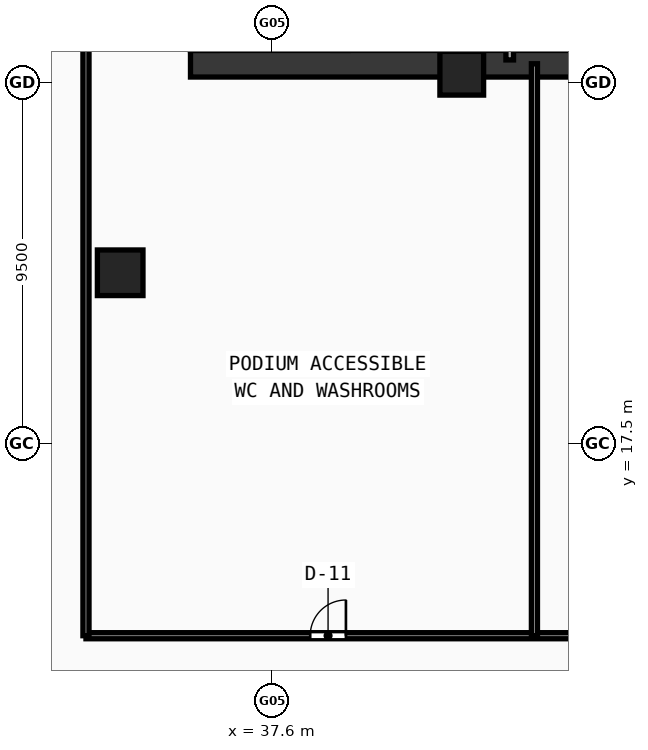
"""IFC4 building model, lengths in metres.
Left out: names, types, materials, properties, quantities, classifications, styles, units other than length and angle.
Written with IfcOpenShell. Run it as: python <this file> out.ifc"""

import sys

from ifc_helpers import new_model, si_unit, direction, frame, frame_2d, origin, origin_with_axes, origin_2d, place, context, subcontext, project, spatial, rectangle, hollow_rectangle, extrude, source, transform, mapped, element, fill, save


model = new_model("IFC4")
c1 = context("Model", 3, precision=1e-05, world=origin(), true_north=direction((0.0, 1.0)))
c2 = subcontext(c1, "Body", "Model", "MODEL_VIEW")
j1 = project(units=[si_unit("LENGTHUNIT", "METRE"), si_unit("PLANEANGLEUNIT", "RADIAN")], contexts=[c1])
p1 = place(None, origin())
s1 = spatial("IfcSite", under=j1, at=p1, CompositionType="ELEMENT")
p2 = place(p1, origin())
s2 = spatial("IfcBuilding", under=s1, at=p2, CompositionType="ELEMENT")
p3 = place(p2, frame((0.0, 0.0, 4.8)))
s3 = spatial("IfcBuildingStorey", under=s2, at=p3, CompositionType="ELEMENT", Elevation=4.8)
p4 = place(p3, frame((35.45, 27.5, 0.0), z_axis=(0.0, 0.0, 1.0), x_axis=(1.0, 0.0, 0.0)))
e1 = element("IfcWall", 1, at=p4, inside=s3, PredefinedType="SHEAR", context=c2, shape_type="SweptSolid", body=[
    extrude(rectangle(XDim=25.1, YDim=0.7, at=frame_2d((12.55, 0.0))), origin(), (0.0, 0.0, 1.0), 4.52),
])
m1 = source(origin(), c2, "Body", "SweptSolid", [
    extrude(hollow_rectangle(XDim=1.15, YDim=1.15, WallThickness=0.048, at=origin_2d()), origin(), (0.0, 0.0, 1.0), 4.8),
])
p5 = place(p3, frame((42.588, 27.25, -0.28), z_axis=(0.0, 0.0, 1.0), x_axis=(1.0, 0.0, 0.0)))
e2 = element("IfcColumn", 2, at=p5, inside=s3, PredefinedType="COLUMN", context=c2, shape_type="MappedRepresentation", body=[
    mapped(m1, transform((0.0, 0.0, 0.0), scale=1.0)),
])
m2 = source(origin(), c2, "Body", "SweptSolid", [
    extrude(hollow_rectangle(XDim=1.2, YDim=1.2, WallThickness=0.05, at=origin_2d()), origin(), (0.0, 0.0, 1.0), 4.8),
])
p6 = place(p3, frame((33.6, 22.0, -0.28), z_axis=(0.0, 0.0, 1.0), x_axis=(1.0, 0.0, 0.0)))
e3 = element("IfcColumn", 3, at=p6, inside=s3, PredefinedType="COLUMN", context=c2, shape_type="MappedRepresentation", body=[
    mapped(m2, transform((0.0, 0.0, 0.0), scale=1.0)),
])
p7 = place(p3, frame((43.85, 27.6, 0.0), z_axis=(0.0, 0.0, 1.0), x_axis=(0.0, 1.0, 0.0)))
e4 = element("IfcWall", 4, at=p7, inside=s3, PredefinedType="SOLIDWALL", context=c2, shape_type="SweptSolid", body=[
    extrude(rectangle(XDim=6.22, YDim=0.2, at=frame_2d((3.11, 0.0))), origin(), (0.0, 0.0, 1.0), 4.52),
])
p8 = place(p7, frame((2.25, 0.0, 0.0)))
e5 = element("IfcOpeningElement", 5, at=p8, cuts=e4, PredefinedType="OPENING", context=c2, shape_type="SweptSolid", body=[
    extrude(rectangle(XDim=1.05, YDim=2.1, at=frame_2d((0.525, 1.05))), frame((0.0, 0.11, 0.0), z_axis=(0.0, -1.0, 0.0), x_axis=(1.0, 0.0, 0.0)), (0.0, 0.0, 1.0), 0.22),
])
p9 = place(p3, frame((42.32, 27.6, 0.0), z_axis=(0.0, 0.0, 1.0), x_axis=(0.0, 1.0, 0.0)))
e6 = element("IfcWall", 6, at=p9, inside=s3, PredefinedType="PARTITIONING", context=c2, shape_type="SweptSolid", body=[
    extrude(rectangle(XDim=5.9, YDim=0.16, at=frame_2d((2.95, 0.0))), origin(), (0.0, 0.0, 1.0), 4.52),
])
p10 = place(p9, frame((3.2, 0.0, 0.0)))
e7 = element("IfcOpeningElement", 7, at=p10, cuts=e6, PredefinedType="OPENING", context=c2, shape_type="SweptSolid", body=[
    extrude(rectangle(XDim=0.94, YDim=2.1, at=frame_2d((0.47, 1.05))), frame((0.0, 0.09, 0.0), z_axis=(0.0, -1.0, 0.0), x_axis=(1.0, 0.0, 0.0)), (0.0, 0.0, 1.0), 0.18),
])
p11 = place(p3, frame((32.7, 12.45, 0.0), z_axis=(0.0, 0.0, 1.0), x_axis=(1.0, 0.0, 0.0)))
e8 = element("IfcWall", 8, at=p11, inside=s3, PredefinedType="PARTITIONING", context=c2, shape_type="SweptSolid", body=[
    extrude(rectangle(XDim=30.6, YDim=0.16, at=frame_2d((15.3, 0.0))), origin(), (0.0, 0.0, 1.0), 3.62),
])
p12 = place(p11, frame((14.8, 0.0, 0.0)))
e9 = element("IfcOpeningElement", 9, at=p12, cuts=e8, PredefinedType="OPENING", context=c2, shape_type="SweptSolid", body=[
    extrude(rectangle(XDim=0.92, YDim=2.1, at=frame_2d((0.46, 1.05))), frame((0.0, 0.09, 0.0), z_axis=(0.0, -1.0, 0.0), x_axis=(1.0, 0.0, 0.0)), (0.0, 0.0, 1.0), 0.18),
])
p13 = place(p11, frame((5.9, 0.0, 0.0)))
e10 = element("IfcOpeningElement", 10, at=p13, cuts=e8, PredefinedType="OPENING", context=c2, shape_type="SweptSolid", body=[
    extrude(rectangle(XDim=0.94, YDim=2.1, at=frame_2d((0.47, 1.05))), frame((0.0, 0.09, 0.0), z_axis=(0.0, -1.0, 0.0), x_axis=(1.0, 0.0, 0.0)), (0.0, 0.0, 1.0), 0.18),
])
p14 = place(p3, frame((32.7, 12.45, 0.0), z_axis=(0.0, 0.0, 1.0), x_axis=(0.0, 1.0, 0.0)))
e11 = element("IfcWall", 11, at=p14, inside=s3, PredefinedType="PARTITIONING", context=c2, shape_type="SweptSolid", body=[
    extrude(rectangle(XDim=26.75, YDim=0.16, at=frame_2d((13.375, 0.0))), origin(), (0.0, 0.0, 1.0), 3.62),
])
p15 = place(p3, frame((44.5, 12.45, 0.0), z_axis=(0.0, 0.0, 1.0), x_axis=(0.0, 1.0, 0.0)))
e12 = element("IfcWall", 12, at=p15, inside=s3, PredefinedType="PARTITIONING", context=c2, shape_type="SweptSolid", body=[
    extrude(rectangle(XDim=15.05, YDim=0.16, at=frame_2d((7.525, 0.0))), origin(), (0.0, 0.0, 1.0), 3.62),
])
m3 = source(origin(), c2, "Body", "SweptSolid", [
    extrude(rectangle(XDim=0.94, YDim=2.1, at=frame_2d((0.47, 1.05))), frame((0.0, 0.025, 0.0), z_axis=(0.0, -1.0, 0.0), x_axis=(1.0, 0.0, 0.0)), (0.0, 0.0, 1.0), 0.05),
])
p16 = place(p13, origin_with_axes())
e13 = element("IfcDoor", 13, at=p16, inside=s3, OperationType="SINGLE_SWING_RIGHT", PredefinedType="DOOR", context=c2, shape_type="MappedRepresentation", body=[
    mapped(m3, transform((0.0, 0.0, 0.0), scale=1.0)),
])
fill(e10, e13)
save(model, sys.argv[1])
